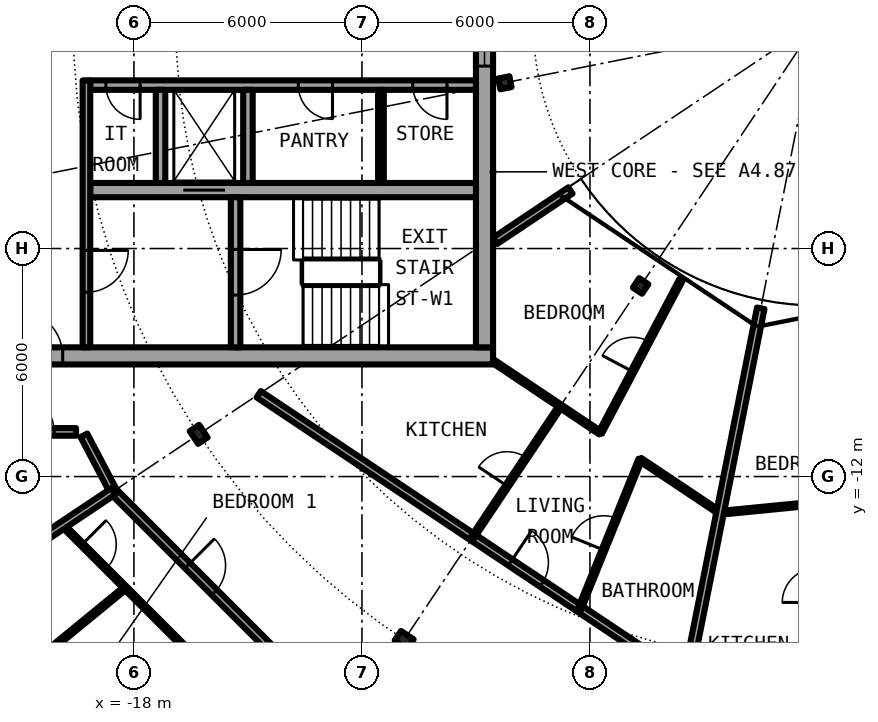
"""IFC4 building model, lengths in metres.
Left out: names, types, materials, properties, quantities, classifications, styles, units other than length and angle.
Written with IfcOpenShell. Run it as: python <this file> out.ifc"""

import sys

from ifc_helpers import new_model, si_unit, direction, frame, frame_2d, origin, origin_2d, place, context, subcontext, project, spatial, rectangle, i_section, extrude, element, fill, save


model = new_model("IFC4")
c1 = context("Model", 3, precision=1e-05, world=origin(), true_north=direction((0.0, 1.0)))
c2 = subcontext(c1, "Body", "Model", "MODEL_VIEW")
j1 = project(units=[si_unit("LENGTHUNIT", "METRE"), si_unit("PLANEANGLEUNIT", "RADIAN")], contexts=[c1])
p1 = place(None, origin())
s1 = spatial("IfcSite", under=j1, at=p1, CompositionType="ELEMENT")
p2 = place(p1, origin())
s2 = spatial("IfcBuilding", under=s1, at=p2, CompositionType="ELEMENT")
p3 = place(p2, frame((0.0, 0.0, 212.7)))
s3 = spatial("IfcBuildingStorey", under=s2, at=p3, CompositionType="ELEMENT", Elevation=212.7)
for number, where, z_axis, x_axis in (
    (1, (-16.297, -10.889, 0.0), (0.0, 0.0, 1.0), (-0.831, -0.556, 0.0)),
    (2, (-10.889, -16.297, 0.0), (0.0, 0.0, 1.0), (-0.556, -0.831, 0.0)),
):
    element("IfcColumn", number, at=place(p3, frame(where, z_axis=z_axis, x_axis=x_axis)), inside=s3, PredefinedType="COLUMN", context=c2, shape_type="SweptSolid", body=[
        extrude(i_section(OverallWidth=0.3, OverallDepth=0.4, WebThickness=0.013, FlangeThickness=0.024, FilletRadius=0.027, at=origin_2d()), origin(), (0.0, 0.0, 1.0), 3.05),
    ])
for number, where, z_axis, x_axis in (
    (3, (-8.239, -1.639, 0.0), (0.0, 0.0, 1.0), (-0.981, -0.195, 0.0)),
    (4, (-4.667, -6.984, 0.0), (0.0, 0.0, 1.0), (-0.556, -0.831, 0.0)),
):
    element("IfcColumn", number, at=place(p3, frame(where, z_axis=z_axis, x_axis=x_axis)), inside=s3, PredefinedType="COLUMN", context=c2, shape_type="SweptSolid", body=[
        extrude(i_section(OverallWidth=0.3, OverallDepth=0.29, WebThickness=0.009, FlangeThickness=0.014, FilletRadius=0.027, at=origin_2d()), origin(), (0.0, 0.0, 1.0), 3.05),
    ])
p4 = place(p3, frame((-22.699, -15.167, 0.0), z_axis=(0.0, 0.0, 1.0), x_axis=(0.634382322723, -0.773019449054, 0.0)))
e5 = element("IfcWall", 5, at=p4, inside=s3, PredefinedType="SOLIDWALL", context=c2, shape_type="SweptSolid", body=[
    extrude(rectangle(XDim=5.352, YDim=0.25, at=frame_2d((2.676, 0.0))), origin(), (0.0, 0.0, 1.0), 2.7),
])
p5 = place(p4, frame((0.841, 0.0, 0.0)))
e6 = element("IfcOpeningElement", 6, at=p5, cuts=e5, PredefinedType="OPENING", context=c2, shape_type="SweptSolid", body=[
    extrude(rectangle(XDim=1.0, YDim=2.2, at=frame_2d((0.5, 1.1))), frame((0.0, 0.135, 0.0), z_axis=(0.0, -1.0, 0.0), x_axis=(1.0, 0.0, 0.0)), (0.0, 0.0, 1.0), 0.27),
])
p6 = place(p4, frame((3.111, 0.0, 0.3)))
e7 = element("IfcOpeningElement", 7, at=p6, cuts=e5, PredefinedType="OPENING", context=c2, shape_type="SweptSolid", body=[
    extrude(rectangle(XDim=1.8, YDim=2.1, at=frame_2d((0.9, 1.05))), frame((0.0, 0.135, 0.0), z_axis=(0.0, -1.0, 0.0), x_axis=(1.0, 0.0, 0.0)), (0.0, 0.0, 1.0), 0.27),
])
p7 = place(p3, frame((-22.05, -8.825, 0.0), z_axis=(0.0, 0.0, 1.0), x_axis=(1.0, 0.0, 0.0)))
e8 = element("IfcWall", 8, at=p7, inside=s3, PredefinedType="SHEAR", context=c2, shape_type="SweptSolid", body=[
    extrude(rectangle(XDim=13.5, YDim=0.45, at=frame_2d((6.75, 0.0))), origin(), (0.0, 0.0, 1.0), 3.05),
])
p8 = place(p7, frame((0.975, 0.0, 0.0)))
e9 = element("IfcOpeningElement", 9, at=p8, cuts=e8, PredefinedType="OPENING", context=c2, shape_type="SweptSolid", body=[
    extrude(rectangle(XDim=1.2, YDim=2.3, at=frame_2d((0.6, 1.15))), frame((0.0, 0.235, 0.0), z_axis=(0.0, -1.0, 0.0), x_axis=(1.0, 0.0, 0.0)), (0.0, 0.0, 1.0), 0.47),
])
p9 = place(p3, frame((-8.775, 8.6, 0.0), z_axis=(0.0, 0.0, 1.0), x_axis=(0.0, -1.0, 0.0)))
e10 = element("IfcWall", 10, at=p9, inside=s3, PredefinedType="SHEAR", context=c2, shape_type="SweptSolid", body=[
    extrude(rectangle(XDim=17.2, YDim=0.45, at=frame_2d((8.6, 0.0))), origin(), (0.0, 0.0, 1.0), 3.05),
])
p10 = place(p9, frame((7.4, 0.0, 0.1)))
e11 = element("IfcOpeningElement", 11, at=p10, cuts=e10, PredefinedType="OPENING", context=c2, shape_type="SweptSolid", body=[
    extrude(rectangle(XDim=2.4, YDim=2.2, at=frame_2d((1.2, 1.1))), frame((0.0, 0.235, 0.0), z_axis=(0.0, -1.0, 0.0), x_axis=(1.0, 0.0, 0.0)), (0.0, 0.0, 1.0), 0.47),
])
p11 = place(p3, frame((-9.0, -1.7, 0.0), z_axis=(0.0, 0.0, 1.0), x_axis=(-1.0, 0.0, 0.0)))
e12 = element("IfcWall", 12, at=p11, inside=s3, PredefinedType="SHEAR", context=c2, shape_type="SweptSolid", body=[
    extrude(rectangle(XDim=10.15, YDim=0.25, at=frame_2d((5.075, 0.0))), origin(), (0.0, 0.0, 1.0), 3.05),
])
p12 = place(p11, frame((0.762, 0.0, 0.0)))
e13 = element("IfcOpeningElement", 13, at=p12, cuts=e12, PredefinedType="OPENING", context=c2, shape_type="SweptSolid", body=[
    extrude(rectangle(XDim=0.9, YDim=2.3, at=frame_2d((0.45, 1.15))), frame((0.0, 0.135, 0.0), z_axis=(0.0, -1.0, 0.0), x_axis=(1.0, 0.0, 0.0)), (0.0, 0.0, 1.0), 0.27),
])
p13 = place(p11, frame((3.775, 0.0, 0.0)))
e14 = element("IfcOpeningElement", 14, at=p13, cuts=e12, PredefinedType="OPENING", context=c2, shape_type="SweptSolid", body=[
    extrude(rectangle(XDim=0.9, YDim=2.3, at=frame_2d((0.45, 1.15))), frame((0.0, 0.135, 0.0), z_axis=(0.0, -1.0, 0.0), x_axis=(1.0, 0.0, 0.0)), (0.0, 0.0, 1.0), 0.27),
])
p14 = place(p11, frame((8.837, 0.0, 0.0)))
e15 = element("IfcOpeningElement", 15, at=p14, cuts=e12, PredefinedType="OPENING", context=c2, shape_type="SweptSolid", body=[
    extrude(rectangle(XDim=0.9, YDim=2.3, at=frame_2d((0.45, 1.15))), frame((0.0, 0.135, 0.0), z_axis=(0.0, -1.0, 0.0), x_axis=(1.0, 0.0, 0.0)), (0.0, 0.0, 1.0), 0.27),
])
p15 = place(p3, frame((-9.0, -4.462, 0.0), z_axis=(0.0, 0.0, 1.0), x_axis=(-1.0, 0.0, 0.0)))
e16 = element("IfcWall", 16, at=p15, inside=s3, PredefinedType="SHEAR", context=c2, shape_type="SweptSolid", body=[
    extrude(rectangle(XDim=10.15, YDim=0.375, at=frame_2d((5.075, 0.0))), origin(), (0.0, 0.0, 1.0), 3.05),
])
p16 = place(p15, frame((6.6, 0.0, 0.0)))
e17 = element("IfcOpeningElement", 17, at=p16, cuts=e16, PredefinedType="OPENING", context=c2, shape_type="SweptSolid", body=[
    extrude(rectangle(XDim=1.1, YDim=2.3, at=frame_2d((0.55, 1.15))), frame((0.0, 0.198, 0.0), z_axis=(0.0, -1.0, 0.0), x_axis=(1.0, 0.0, 0.0)), (0.0, 0.0, 1.0), 0.395),
])
p17 = place(p3, frame((-15.325, -4.65, 0.0), z_axis=(0.0, 0.0, 1.0), x_axis=(0.0, -1.0, 0.0)))
e18 = element("IfcWall", 18, at=p17, inside=s3, PredefinedType="SHEAR", context=c2, shape_type="SweptSolid", body=[
    extrude(rectangle(XDim=3.95, YDim=0.25, at=frame_2d((1.975, 0.0))), origin(), (0.0, 0.0, 1.0), 3.05),
])
p18 = place(p17, frame((1.375, 0.0, 0.0)))
e19 = element("IfcOpeningElement", 19, at=p18, cuts=e18, PredefinedType="OPENING", context=c2, shape_type="SweptSolid", body=[
    extrude(rectangle(XDim=1.2, YDim=2.3, at=frame_2d((0.6, 1.15))), frame((0.0, 0.135, 0.0), z_axis=(0.0, -1.0, 0.0), x_axis=(1.0, 0.0, 0.0)), (0.0, 0.0, 1.0), 0.27),
])
for number, where, z_axis, x_axis in (
    (20, (-15.0, -1.825, 0.0), (0.0, 0.0, 1.0), (0.0, -1.0, 0.0)),
    (21, (-17.3, -1.825, 0.0), (0.0, 0.0, 1.0), (0.0, -1.0, 0.0)),
):
    element("IfcWall", number, at=place(p3, frame(where, z_axis=z_axis, x_axis=x_axis)), inside=s3, PredefinedType="SOLIDWALL", context=c2, shape_type="SweptSolid", body=[
        extrude(rectangle(XDim=2.45, YDim=0.25, at=frame_2d((1.225, 0.0))), origin(), (0.0, 0.0, 1.0), 2.7),
    ])
p19 = place(p3, frame((-19.25, -1.575, 0.0), z_axis=(0.0, 0.0, 1.0), x_axis=(0.0, -1.0, 0.0)))
e22 = element("IfcWall", 22, at=p19, inside=s3, PredefinedType="SOLIDWALL", context=c2, shape_type="SweptSolid", body=[
    extrude(rectangle(XDim=7.025, YDim=0.2, at=frame_2d((3.513, 0.0))), origin(), (0.0, 0.0, 1.0), 2.7),
])
p20 = place(p19, frame((4.475, 0.0, 0.0)))
e23 = element("IfcOpeningElement", 23, at=p20, cuts=e22, PredefinedType="OPENING", context=c2, shape_type="SweptSolid", body=[
    extrude(rectangle(XDim=1.1, YDim=2.3, at=frame_2d((0.55, 1.15))), frame((0.0, 0.11, 0.0), z_axis=(0.0, -1.0, 0.0), x_axis=(1.0, 0.0, 0.0)), (0.0, 0.0, 1.0), 0.22),
])
p21 = place(p3, frame((-11.5, -1.825, 0.0), z_axis=(0.0, 0.0, 1.0), x_axis=(0.0, -1.0, 0.0)))
e24 = element("IfcWall", 24, at=p21, inside=s3, PredefinedType="PARTITIONING", context=c2, shape_type="SweptSolid", body=[
    extrude(rectangle(XDim=2.45, YDim=0.15, at=frame_2d((1.225, 0.0))), origin(), (0.0, 0.0, 1.0), 2.7),
])
p22 = place(p3, frame((-19.869, -13.285, 0.0), z_axis=(0.0, 0.0, 1.0), x_axis=(0.707290020325, -0.706923494552, 0.0)))
e25 = element("IfcWall", 25, at=p22, inside=s3, PredefinedType="PARTITIONING", context=c2, shape_type="SweptSolid", body=[
    extrude(rectangle(XDim=4.663, YDim=0.1, at=frame_2d((2.331, 0.0))), origin(), (0.0, 0.0, 1.0), 2.7),
])
p23 = place(p22, frame((0.712, 0.0, 0.0)))
e26 = element("IfcOpeningElement", 26, at=p23, cuts=e25, PredefinedType="OPENING", context=c2, shape_type="SweptSolid", body=[
    extrude(rectangle(XDim=0.9, YDim=2.3, at=frame_2d((0.45, 1.15))), frame((0.0, 0.06, 0.0), z_axis=(0.0, -1.0, 0.0), x_axis=(1.0, 0.0, 0.0)), (0.0, 0.0, 1.0), 0.12),
])
p24 = place(p3, frame((-19.317, -10.915, 0.0), z_axis=(0.0, 0.0, 1.0), x_axis=(0.465359652486, -0.885121683068, 0.0)))
e27 = element("IfcWall", 27, at=p24, inside=s3, PredefinedType="PARTITIONING", context=c2, shape_type="SweptSolid", body=[
    extrude(rectangle(XDim=1.665, YDim=0.2, at=frame_2d((0.833, 0.0))), origin(), (0.0, 0.0, 1.0), 2.7),
])
p25 = place(p3, frame((-18.542, -12.389, 0.0), z_axis=(0.0, 0.0, 1.0), x_axis=(0.707106781187, -0.707106781187, 0.0)))
e28 = element("IfcWall", 28, at=p25, inside=s3, PredefinedType="PARTITIONING", context=c2, shape_type="SweptSolid", body=[
    extrude(rectangle(XDim=8.702, YDim=0.2, at=frame_2d((4.351, 0.0))), origin(), (0.0, 0.0, 1.0), 2.7),
])
p26 = place(p25, frame((2.763, 0.0, 0.0)))
e29 = element("IfcOpeningElement", 29, at=p26, cuts=e28, PredefinedType="OPENING", context=c2, shape_type="SweptSolid", body=[
    extrude(rectangle(XDim=1.0, YDim=2.3, at=frame_2d((0.5, 1.15))), frame((0.0, 0.11, 0.0), z_axis=(0.0, -1.0, 0.0), x_axis=(1.0, 0.0, 0.0)), (0.0, 0.0, 1.0), 0.22),
])
p27 = place(p3, frame((-3.454, -17.36, 0.0), z_axis=(0.0, 0.0, 1.0), x_axis=(0.995189328429, 0.097970406658, 0.0)))
e30 = element("IfcWall", 30, at=p27, inside=s3, PredefinedType="PARTITIONING", context=c2, shape_type="SweptSolid", body=[
    extrude(rectangle(XDim=10.28, YDim=0.2, at=frame_2d((5.14, 0.0))), origin(), (0.0, 0.0, 1.0), 2.7),
])
p28 = place(p27, frame((4.639, 0.0, 0.0)))
e31 = element("IfcOpeningElement", 31, at=p28, cuts=e30, PredefinedType="OPENING", context=c2, shape_type="SweptSolid", body=[
    extrude(rectangle(XDim=1.0, YDim=2.3, at=frame_2d((0.5, 1.15))), frame((0.0, 0.11, 0.0), z_axis=(0.0, -1.0, 0.0), x_axis=(1.0, 0.0, 0.0)), (0.0, 0.0, 1.0), 0.22),
])
p29 = place(p3, frame((-14.717, -9.834, 0.0), z_axis=(0.0, 0.0, 1.0), x_axis=(0.831492679744, -0.555535708603, 0.0)))
e32 = element("IfcWall", 32, at=p29, inside=s3, PredefinedType="PARTITIONING", context=c2, shape_type="SweptSolid", body=[
    extrude(rectangle(XDim=13.549, YDim=0.2, at=frame_2d((6.775, 0.0))), origin(), (0.0, 0.0, 1.0), 2.7),
])
p30 = place(p29, frame((7.966, 0.0, 0.0)))
e33 = element("IfcOpeningElement", 33, at=p30, cuts=e32, PredefinedType="OPENING", context=c2, shape_type="SweptSolid", body=[
    extrude(rectangle(XDim=1.0, YDim=2.3, at=frame_2d((0.5, 1.15))), frame((0.0, 0.11, 0.0), z_axis=(0.0, -1.0, 0.0), x_axis=(1.0, 0.0, 0.0)), (0.0, 0.0, 1.0), 0.22),
])
p31 = place(p3, frame((-2.58, -12.955, 0.0), z_axis=(0.0, 0.0, 1.0), x_axis=(0.995206557747, 0.097795232084, 0.0)))
e34 = element("IfcWall", 34, at=p31, inside=s3, PredefinedType="PARTITIONING", context=c2, shape_type="SweptSolid", body=[
    extrude(rectangle(XDim=3.834, YDim=0.1, at=frame_2d((1.917, 0.0))), origin(), (0.0, 0.0, 1.0), 2.7),
])
p32 = place(p3, frame((-8.549, -8.965, 0.0), z_axis=(0.0, 0.0, 1.0), x_axis=(0.831463102602, -0.555579975352, 0.0)))
e35 = element("IfcWall", 35, at=p32, inside=s3, PredefinedType="PARTITIONING", context=c2, shape_type="SweptSolid", body=[
    extrude(rectangle(XDim=3.393, YDim=0.1, at=frame_2d((1.696, 0.0))), origin(), (0.0, 0.0, 1.0), 2.7),
])
p33 = place(p3, frame((-4.677, -11.552, 0.0), z_axis=(0.0, 0.0, 1.0), x_axis=(0.83155963659, -0.555435478517, 0.0)))
e36 = element("IfcWall", 36, at=p33, inside=s3, PredefinedType="PARTITIONING", context=c2, shape_type="SweptSolid", body=[
    extrude(rectangle(XDim=2.528, YDim=0.1, at=frame_2d((1.264, 0.0))), origin(), (0.0, 0.0, 1.0), 2.7),
])
p34 = place(p3, frame((-21.675, -10.825, 0.0), z_axis=(0.0, 0.0, 1.0), x_axis=(1.0, 0.0, 0.0)))
e37 = element("IfcWall", 37, at=p34, inside=s3, PredefinedType="PARTITIONING", context=c2, shape_type="SweptSolid", body=[
    extrude(rectangle(XDim=2.152, YDim=0.2, at=frame_2d((1.076, 0.0))), origin(), (0.0, 0.0, 1.0), 2.7),
])
p35 = place(p34, frame((0.576, 0.0, 0.0)))
e38 = element("IfcOpeningElement", 38, at=p35, cuts=e37, PredefinedType="OPENING", context=c2, shape_type="SweptSolid", body=[
    extrude(rectangle(XDim=1.0, YDim=2.3, at=frame_2d((0.5, 1.15))), frame((0.0, 0.11, 0.0), z_axis=(0.0, -1.0, 0.0), x_axis=(1.0, 0.0, 0.0)), (0.0, 0.0, 1.0), 0.22),
])
p36 = place(p3, frame((-6.513, -4.472, 0.0), z_axis=(0.0, 0.0, 1.0), x_axis=(-0.831403409976, -0.555669299026, 0.0)))
e39 = element("IfcWall", 39, at=p36, inside=s3, PredefinedType="PARTITIONING", context=c2, shape_type="SweptSolid", body=[
    extrude(rectangle(XDim=2.383, YDim=0.2, at=frame_2d((1.191, 0.0))), origin(), (0.0, 0.0, 1.0), 2.7),
])
p37 = place(p3, frame((-22.595, -15.098, 0.0), z_axis=(0.0, 0.0, 1.0), x_axis=(0.831387096605, 0.55569370664, 0.0)))
e40 = element("IfcWall", 40, at=p37, inside=s3, PredefinedType="PARTITIONING", context=c2, shape_type="SweptSolid", body=[
    extrude(rectangle(XDim=4.875, YDim=0.2, at=frame_2d((2.438, 0.0))), origin(), (0.0, 0.0, 1.0), 2.7),
])
p38 = place(p3, frame((-21.023, -17.22, 0.0), z_axis=(0.0, 0.0, 1.0), x_axis=(0.773548271597, 0.633737383709, 0.0)))
e41 = element("IfcWall", 41, at=p38, inside=s3, PredefinedType="PARTITIONING", context=c2, shape_type="SweptSolid", body=[
    extrude(rectangle(XDim=3.618, YDim=0.1, at=frame_2d((1.809, 0.0))), origin(), (0.0, 0.0, 1.0), 2.7),
])
p39 = place(p3, frame((-9.085, -13.597, 0.0), z_axis=(0.0, 0.0, 1.0), x_axis=(0.555528237031, 0.831497671591, 0.0)))
e42 = element("IfcWall", 42, at=p39, inside=s3, PredefinedType="PARTITIONING", context=c2, shape_type="SweptSolid", body=[
    extrude(rectangle(XDim=4.149, YDim=0.1, at=frame_2d((2.075, 0.0))), origin(), (0.0, 0.0, 1.0), 2.7),
])
p40 = place(p39, frame((1.625, 0.0, 0.0)))
e43 = element("IfcOpeningElement", 43, at=p40, cuts=e42, PredefinedType="OPENING", context=c2, shape_type="SweptSolid", body=[
    extrude(rectangle(XDim=0.9, YDim=2.3, at=frame_2d((0.45, 1.15))), frame((0.0, 0.06, 0.0), z_axis=(0.0, -1.0, 0.0), x_axis=(1.0, 0.0, 0.0)), (0.0, 0.0, 1.0), 0.12),
])
p41 = place(p3, frame((-6.269, -15.478, 0.0), z_axis=(0.0, 0.0, 1.0), x_axis=(0.375509828455, 0.926818411952, 0.0)))
e44 = element("IfcWall", 44, at=p41, inside=s3, PredefinedType="PARTITIONING", context=c2, shape_type="SweptSolid", body=[
    extrude(rectangle(XDim=4.237, YDim=0.1, at=frame_2d((2.119, 0.0))), origin(), (0.0, 0.0, 1.0), 2.7),
])
p42 = place(p41, frame((1.669, 0.0, 0.0)))
e45 = element("IfcOpeningElement", 45, at=p42, cuts=e44, PredefinedType="OPENING", context=c2, shape_type="SweptSolid", body=[
    extrude(rectangle(XDim=0.9, YDim=2.3, at=frame_2d((0.45, 1.15))), frame((0.0, 0.06, 0.0), z_axis=(0.0, -1.0, 0.0), x_axis=(1.0, 0.0, 0.0)), (0.0, 0.0, 1.0), 0.12),
])
p43 = place(p3, frame((-5.729, -10.849, 0.0), z_axis=(0.0, 0.0, 1.0), x_axis=(0.466962677975, 0.884277025246, 0.0)))
e46 = element("IfcWall", 46, at=p43, inside=s3, PredefinedType="PARTITIONING", context=c2, shape_type="SweptSolid", body=[
    extrude(rectangle(XDim=4.549, YDim=0.1, at=frame_2d((2.274, 0.0))), origin(), (0.0, 0.0, 1.0), 2.7),
])
p44 = place(p43, frame((1.824, 0.0, 0.0)))
e47 = element("IfcOpeningElement", 47, at=p44, cuts=e46, PredefinedType="OPENING", context=c2, shape_type="SweptSolid", body=[
    extrude(rectangle(XDim=0.9, YDim=2.3, at=frame_2d((0.45, 1.15))), frame((0.0, 0.06, 0.0), z_axis=(0.0, -1.0, 0.0), x_axis=(1.0, 0.0, 0.0)), (0.0, 0.0, 1.0), 0.12),
])
p45 = place(p3, frame((-3.453, -17.36, 0.0), z_axis=(0.0, 0.0, 1.0), x_axis=(0.19507162238, 0.980788999807, 0.0)))
e48 = element("IfcWall", 48, at=p45, inside=s3, PredefinedType="PARTITIONING", context=c2, shape_type="SweptSolid", body=[
    extrude(rectangle(XDim=9.98, YDim=0.2, at=frame_2d((4.99, 0.0))), origin(), (0.0, 0.0, 1.0), 2.7),
])
p46 = place(p16, origin())
e49 = element("IfcDoor", 49, at=p46, inside=s3, OperationType="DOUBLE_DOOR_SLIDING", PredefinedType="DOOR", context=c2, shape_type="SweptSolid", body=[
    extrude(rectangle(XDim=1.1, YDim=2.3, at=frame_2d((0.55, 1.15))), frame((0.0, 0.025, 0.0), z_axis=(0.0, -1.0, 0.0), x_axis=(1.0, 0.0, 0.0)), (0.0, 0.0, 1.0), 0.05),
])
fill(e17, e49)
p47 = place(p12, origin())
e50 = element("IfcDoor", 50, at=p47, inside=s3, OperationType="SINGLE_SWING_RIGHT", PredefinedType="DOOR", context=c2, shape_type="SweptSolid", body=[
    extrude(rectangle(XDim=0.9, YDim=2.3, at=frame_2d((0.45, 1.15))), frame((0.0, 0.025, 0.0), z_axis=(0.0, -1.0, 0.0), x_axis=(1.0, 0.0, 0.0)), (0.0, 0.0, 1.0), 0.05),
])
fill(e13, e50)
p48 = place(p13, origin())
e51 = element("IfcDoor", 51, at=p48, inside=s3, OperationType="SINGLE_SWING_RIGHT", PredefinedType="DOOR", context=c2, shape_type="SweptSolid", body=[
    extrude(rectangle(XDim=0.9, YDim=2.3, at=frame_2d((0.45, 1.15))), frame((0.0, 0.025, 0.0), z_axis=(0.0, -1.0, 0.0), x_axis=(1.0, 0.0, 0.0)), (0.0, 0.0, 1.0), 0.05),
])
fill(e14, e51)
p49 = place(p14, origin())
e52 = element("IfcDoor", 52, at=p49, inside=s3, OperationType="SINGLE_SWING_LEFT", PredefinedType="DOOR", context=c2, shape_type="SweptSolid", body=[
    extrude(rectangle(XDim=0.9, YDim=2.3, at=frame_2d((0.45, 1.15))), frame((0.0, 0.025, 0.0), z_axis=(0.0, -1.0, 0.0), x_axis=(1.0, 0.0, 0.0)), (0.0, 0.0, 1.0), 0.05),
])
fill(e15, e52)
p50 = place(p18, origin())
e53 = element("IfcDoor", 53, at=p50, inside=s3, OperationType="SINGLE_SWING_LEFT", PredefinedType="DOOR", context=c2, shape_type="SweptSolid", body=[
    extrude(rectangle(XDim=1.2, YDim=2.3, at=frame_2d((0.6, 1.15))), frame((0.0, 0.025, 0.0), z_axis=(0.0, -1.0, 0.0), x_axis=(1.0, 0.0, 0.0)), (0.0, 0.0, 1.0), 0.05),
])
fill(e19, e53)
p51 = place(p20, origin())
e54 = element("IfcDoor", 54, at=p51, inside=s3, OperationType="SINGLE_SWING_LEFT", PredefinedType="DOOR", context=c2, shape_type="SweptSolid", body=[
    extrude(rectangle(XDim=1.1, YDim=2.3, at=frame_2d((0.55, 1.15))), frame((0.0, 0.025, 0.0), z_axis=(0.0, -1.0, 0.0), x_axis=(1.0, 0.0, 0.0)), (0.0, 0.0, 1.0), 0.05),
])
fill(e23, e54)
p52 = place(p8, origin())
e55 = element("IfcDoor", 55, at=p52, inside=s3, OperationType="SINGLE_SWING_RIGHT", PredefinedType="DOOR", context=c2, shape_type="SweptSolid", body=[
    extrude(rectangle(XDim=1.2, YDim=2.3, at=frame_2d((0.6, 1.15))), frame((0.0, 0.025, 0.0), z_axis=(0.0, -1.0, 0.0), x_axis=(1.0, 0.0, 0.0)), (0.0, 0.0, 1.0), 0.05),
])
fill(e9, e55)
p53 = place(p10, origin())
e56 = element("IfcWindow", 56, at=p53, inside=s3, PartitioningType="SINGLE_PANEL", PredefinedType="WINDOW", context=c2, shape_type="SweptSolid", body=[
    extrude(rectangle(XDim=2.4, YDim=2.2, at=frame_2d((1.2, 1.1))), frame((0.0, 0.03, 0.0), z_axis=(0.0, -1.0, 0.0), x_axis=(1.0, 0.0, 0.0)), (0.0, 0.0, 1.0), 0.06),
])
fill(e11, e56)
p54 = place(p26, origin())
e57 = element("IfcDoor", 57, at=p54, inside=s3, OperationType="SINGLE_SWING_LEFT", PredefinedType="DOOR", context=c2, shape_type="SweptSolid", body=[
    extrude(rectangle(XDim=1.0, YDim=2.3, at=frame_2d((0.5, 1.15))), frame((0.0, 0.025, 0.0), z_axis=(0.0, -1.0, 0.0), x_axis=(1.0, 0.0, 0.0)), (0.0, 0.0, 1.0), 0.05),
])
fill(e29, e57)
p55 = place(p23, origin())
e58 = element("IfcDoor", 58, at=p55, inside=s3, OperationType="SINGLE_SWING_LEFT", PredefinedType="DOOR", context=c2, shape_type="SweptSolid", body=[
    extrude(rectangle(XDim=0.9, YDim=2.3, at=frame_2d((0.45, 1.15))), frame((0.0, 0.025, 0.0), z_axis=(0.0, -1.0, 0.0), x_axis=(1.0, 0.0, 0.0)), (0.0, 0.0, 1.0), 0.05),
])
fill(e26, e58)
p56 = place(p30, origin())
e59 = element("IfcDoor", 59, at=p56, inside=s3, OperationType="SINGLE_SWING_RIGHT", PredefinedType="DOOR", context=c2, shape_type="SweptSolid", body=[
    extrude(rectangle(XDim=1.0, YDim=2.3, at=frame_2d((0.5, 1.15))), frame((0.0, 0.025, 0.0), z_axis=(0.0, -1.0, 0.0), x_axis=(1.0, 0.0, 0.0)), (0.0, 0.0, 1.0), 0.05),
])
fill(e33, e59)
p57 = place(p42, origin())
e60 = element("IfcDoor", 60, at=p57, inside=s3, OperationType="SINGLE_SWING_LEFT", PredefinedType="DOOR", context=c2, shape_type="SweptSolid", body=[
    extrude(rectangle(XDim=0.9, YDim=2.3, at=frame_2d((0.45, 1.15))), frame((0.0, 0.025, 0.0), z_axis=(0.0, -1.0, 0.0), x_axis=(1.0, 0.0, 0.0)), (0.0, 0.0, 1.0), 0.05),
])
fill(e45, e60)
p58 = place(p40, origin())
e61 = element("IfcDoor", 61, at=p58, inside=s3, OperationType="SINGLE_SWING_LEFT", PredefinedType="DOOR", context=c2, shape_type="SweptSolid", body=[
    extrude(rectangle(XDim=0.9, YDim=2.3, at=frame_2d((0.45, 1.15))), frame((0.0, 0.025, 0.0), z_axis=(0.0, -1.0, 0.0), x_axis=(1.0, 0.0, 0.0)), (0.0, 0.0, 1.0), 0.05),
])
fill(e43, e61)
p59 = place(p44, origin())
e62 = element("IfcDoor", 62, at=p59, inside=s3, OperationType="SINGLE_SWING_RIGHT", PredefinedType="DOOR", context=c2, shape_type="SweptSolid", body=[
    extrude(rectangle(XDim=0.9, YDim=2.3, at=frame_2d((0.45, 1.15))), frame((0.0, 0.025, 0.0), z_axis=(0.0, -1.0, 0.0), x_axis=(1.0, 0.0, 0.0)), (0.0, 0.0, 1.0), 0.05),
])
fill(e47, e62)
p60 = place(p35, origin())
e63 = element("IfcDoor", 63, at=p60, inside=s3, OperationType="SINGLE_SWING_LEFT", PredefinedType="DOOR", context=c2, shape_type="SweptSolid", body=[
    extrude(rectangle(XDim=1.0, YDim=2.3, at=frame_2d((0.5, 1.15))), frame((0.0, 0.025, 0.0), z_axis=(0.0, -1.0, 0.0), x_axis=(1.0, 0.0, 0.0)), (0.0, 0.0, 1.0), 0.05),
])
fill(e38, e63)
save(model, sys.argv[1])
